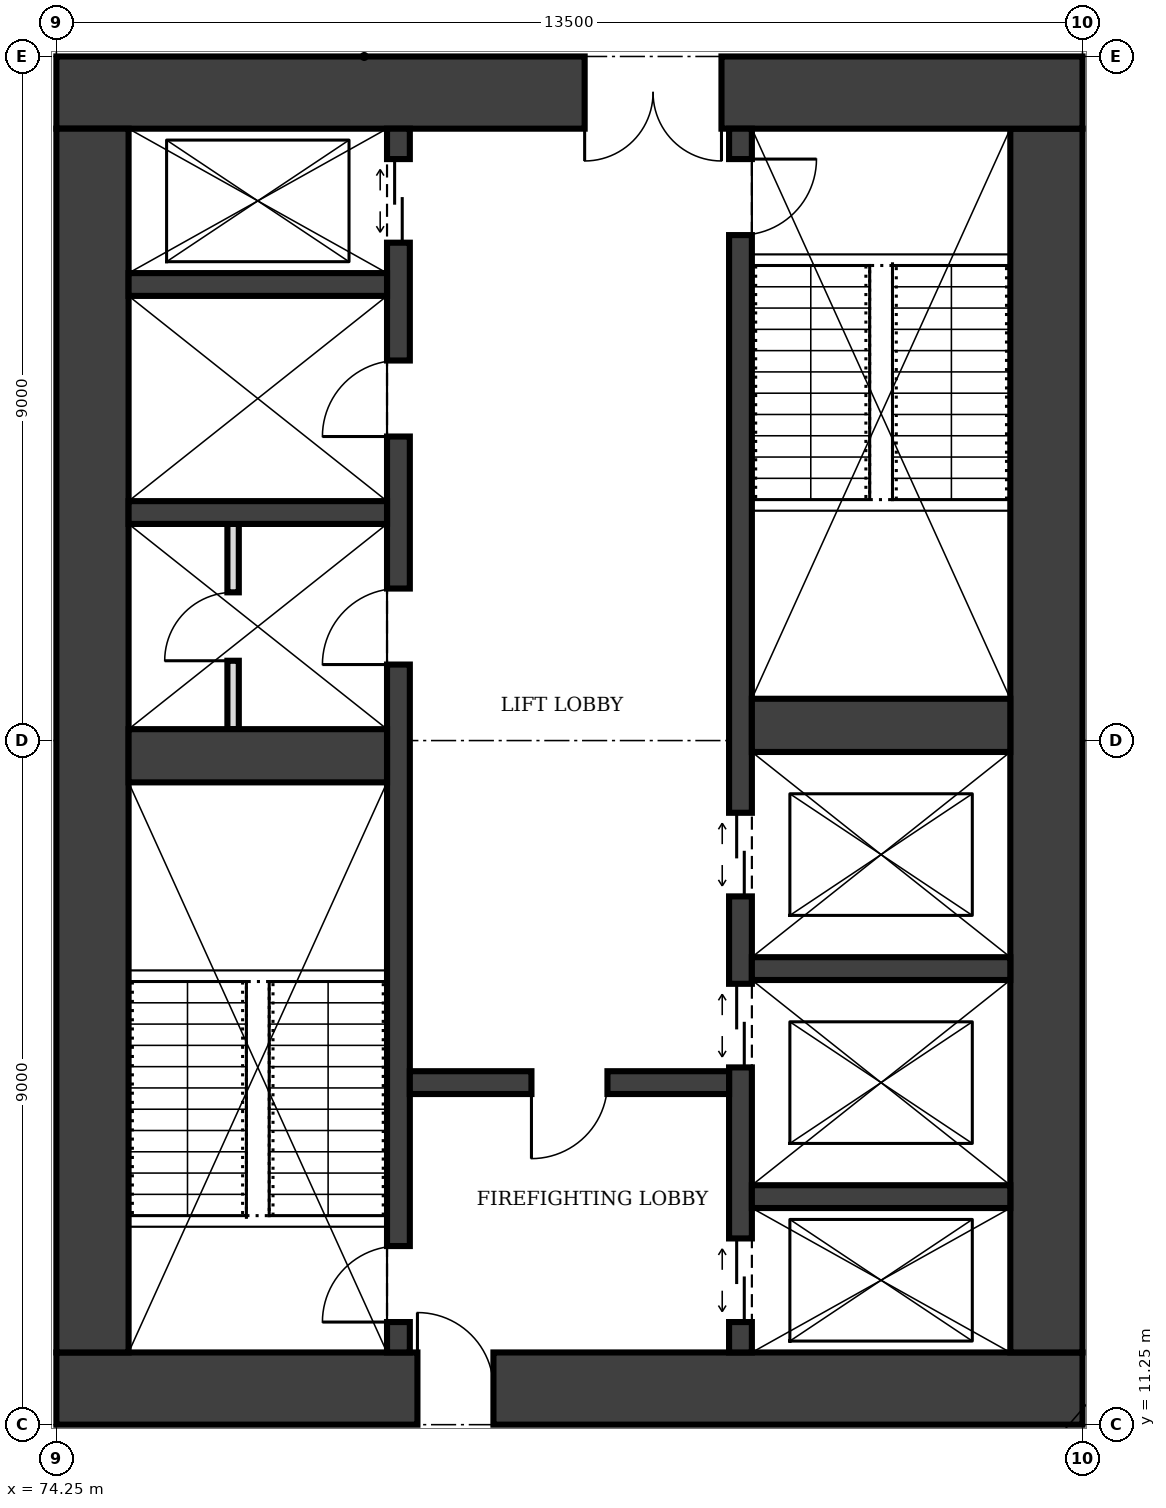
"""IFC4 building model, lengths in metres.
Left out: names, types, materials, properties, quantities, classifications, styles, units other than length and angle.
Written with IfcOpenShell. Run it as: python <this file> out.ifc"""

import sys

from ifc_helpers import new_model, si_unit, direction, frame, frame_2d, origin, place, context, subcontext, project, spatial, rectangle, extrude, element, fill, save


model = new_model("IFC4")
c1 = context("Model", 3, precision=1e-05, world=origin(), true_north=direction((0.0, 1.0)))
c2 = subcontext(c1, "Body", "Model", "MODEL_VIEW")
j1 = project(units=[si_unit("LENGTHUNIT", "METRE"), si_unit("PLANEANGLEUNIT", "RADIAN")], contexts=[c1])
p1 = place(None, origin())
s1 = spatial("IfcSite", under=j1, at=p1, CompositionType="ELEMENT")
p2 = place(p1, origin())
s2 = spatial("IfcBuilding", under=s1, at=p2, CompositionType="ELEMENT")
p3 = place(p2, frame((0.0, 0.0, 137.0)))
s3 = spatial("IfcBuildingStorey", under=s2, at=p3, CompositionType="ELEMENT", Elevation=137.0)
p4 = place(p3, frame((74.25, 11.725, 0.0), z_axis=(0.0, 0.0, 1.0), x_axis=(1.0, 0.0, 0.0)))
e1 = element("IfcWall", 1, at=p4, inside=s3, PredefinedType="SHEAR", context=c2, shape_type="SweptSolid", body=[
    extrude(rectangle(XDim=13.5, YDim=0.95, at=frame_2d((6.75, 0.0))), origin(), (0.0, 0.0, 1.0), 4.0),
])
p5 = place(p4, frame((4.75, 0.0, 0.0)))
e2 = element("IfcOpeningElement", 2, at=p5, cuts=e1, PredefinedType="OPENING", context=c2, shape_type="SweptSolid", body=[
    extrude(rectangle(XDim=1.0, YDim=2.1, at=frame_2d((0.5, 1.05))), frame((0.0, 0.485, 0.0), z_axis=(0.0, -1.0, 0.0), x_axis=(1.0, 0.0, 0.0)), (0.0, 0.0, 1.0), 0.97),
])
p6 = place(p3, frame((87.275, 12.2, 0.0), z_axis=(0.0, 0.0, 1.0), x_axis=(0.0, 1.0, 0.0)))
e3 = element("IfcWall", 3, at=p6, inside=s3, PredefinedType="SHEAR", context=c2, shape_type="SweptSolid", body=[
    extrude(rectangle(XDim=16.1, YDim=0.95, at=frame_2d((8.05, 0.0))), origin(), (0.0, 0.0, 1.0), 4.0),
])
p7 = place(p3, frame((87.75, 28.775, 0.0), z_axis=(0.0, 0.0, 1.0), x_axis=(-1.0, 0.0, 0.0)))
e4 = element("IfcWall", 4, at=p7, inside=s3, PredefinedType="SHEAR", context=c2, shape_type="SweptSolid", body=[
    extrude(rectangle(XDim=13.5, YDim=0.95, at=frame_2d((6.75, 0.0))), origin(), (0.0, 0.0, 1.0), 4.0),
])
p8 = place(p7, frame((4.75, 0.0, 0.0)))
e5 = element("IfcOpeningElement", 5, at=p8, cuts=e4, PredefinedType="OPENING", context=c2, shape_type="SweptSolid", body=[
    extrude(rectangle(XDim=1.8, YDim=2.1, at=frame_2d((0.9, 1.05))), frame((0.0, 0.485, 0.0), z_axis=(0.0, -1.0, 0.0), x_axis=(1.0, 0.0, 0.0)), (0.0, 0.0, 1.0), 0.97),
])
p9 = place(p3, frame((74.725, 28.3, 0.0), z_axis=(0.0, 0.0, 1.0), x_axis=(0.0, -1.0, 0.0)))
e6 = element("IfcWall", 6, at=p9, inside=s3, PredefinedType="SHEAR", context=c2, shape_type="SweptSolid", body=[
    extrude(rectangle(XDim=16.1, YDim=0.95, at=frame_2d((8.05, 0.0))), origin(), (0.0, 0.0, 1.0), 4.0),
])
p10 = place(p3, frame((78.75, 12.2, 0.0), z_axis=(0.0, 0.0, 1.0), x_axis=(0.0, 1.0, 0.0)))
e7 = element("IfcWall", 7, at=p10, inside=s3, PredefinedType="SHEAR", context=c2, shape_type="SweptSolid", body=[
    extrude(rectangle(XDim=16.1, YDim=0.3, at=frame_2d((8.05, 0.0))), origin(), (0.0, 0.0, 1.0), 4.0),
])
p11 = place(p10, frame((0.4, 0.0, 0.0)))
e8 = element("IfcOpeningElement", 8, at=p11, cuts=e7, PredefinedType="OPENING", context=c2, shape_type="SweptSolid", body=[
    extrude(rectangle(XDim=1.0, YDim=2.1, at=frame_2d((0.5, 1.05))), frame((0.0, 0.16, 0.0), z_axis=(0.0, -1.0, 0.0), x_axis=(1.0, 0.0, 0.0)), (0.0, 0.0, 1.0), 0.32),
])
p12 = place(p10, frame((14.6, 0.0, 0.0)))
e9 = element("IfcOpeningElement", 9, at=p12, cuts=e7, PredefinedType="OPENING", context=c2, shape_type="SweptSolid", body=[
    extrude(rectangle(XDim=1.1, YDim=2.1, at=frame_2d((0.55, 1.05))), frame((0.0, 0.16, 0.0), z_axis=(0.0, -1.0, 0.0), x_axis=(1.0, 0.0, 0.0)), (0.0, 0.0, 1.0), 0.32),
])
p13 = place(p10, frame((9.05, 0.0, 0.0)))
e10 = element("IfcOpeningElement", 10, at=p13, cuts=e7, PredefinedType="OPENING", context=c2, shape_type="SweptSolid", body=[
    extrude(rectangle(XDim=1.0, YDim=2.1, at=frame_2d((0.5, 1.05))), frame((0.0, 0.16, 0.0), z_axis=(0.0, -1.0, 0.0), x_axis=(1.0, 0.0, 0.0)), (0.0, 0.0, 1.0), 0.32),
])
p14 = place(p10, frame((12.05, 0.0, 0.0)))
e11 = element("IfcOpeningElement", 11, at=p14, cuts=e7, PredefinedType="OPENING", context=c2, shape_type="SweptSolid", body=[
    extrude(rectangle(XDim=1.0, YDim=2.1, at=frame_2d((0.5, 1.05))), frame((0.0, 0.16, 0.0), z_axis=(0.0, -1.0, 0.0), x_axis=(1.0, 0.0, 0.0)), (0.0, 0.0, 1.0), 0.32),
])
p15 = place(p3, frame((83.25, 12.2, 0.0), z_axis=(0.0, 0.0, 1.0), x_axis=(0.0, 1.0, 0.0)))
e12 = element("IfcWall", 12, at=p15, inside=s3, PredefinedType="SHEAR", context=c2, shape_type="SweptSolid", body=[
    extrude(rectangle(XDim=16.1, YDim=0.3, at=frame_2d((8.05, 0.0))), origin(), (0.0, 0.0, 1.0), 4.0),
])
p16 = place(p15, frame((14.7, 0.0, 0.0)))
e13 = element("IfcOpeningElement", 13, at=p16, cuts=e12, PredefinedType="OPENING", context=c2, shape_type="SweptSolid", body=[
    extrude(rectangle(XDim=1.0, YDim=2.1, at=frame_2d((0.5, 1.05))), frame((0.0, 0.16, 0.0), z_axis=(0.0, -1.0, 0.0), x_axis=(1.0, 0.0, 0.0)), (0.0, 0.0, 1.0), 0.32),
])
p17 = place(p15, frame((0.4, 0.0, 0.0)))
e14 = element("IfcOpeningElement", 14, at=p17, cuts=e12, PredefinedType="OPENING", context=c2, shape_type="SweptSolid", body=[
    extrude(rectangle(XDim=1.1, YDim=2.1, at=frame_2d((0.55, 1.05))), frame((0.0, 0.16, 0.0), z_axis=(0.0, -1.0, 0.0), x_axis=(1.0, 0.0, 0.0)), (0.0, 0.0, 1.0), 0.32),
])
p18 = place(p15, frame((3.75, 0.0, 0.0)))
e15 = element("IfcOpeningElement", 15, at=p18, cuts=e12, PredefinedType="OPENING", context=c2, shape_type="SweptSolid", body=[
    extrude(rectangle(XDim=1.1, YDim=2.1, at=frame_2d((0.55, 1.05))), frame((0.0, 0.16, 0.0), z_axis=(0.0, -1.0, 0.0), x_axis=(1.0, 0.0, 0.0)), (0.0, 0.0, 1.0), 0.32),
])
p19 = place(p15, frame((6.0, 0.0, 0.0)))
e16 = element("IfcOpeningElement", 16, at=p19, cuts=e12, PredefinedType="OPENING", context=c2, shape_type="SweptSolid", body=[
    extrude(rectangle(XDim=1.1, YDim=2.1, at=frame_2d((0.55, 1.05))), frame((0.0, 0.16, 0.0), z_axis=(0.0, -1.0, 0.0), x_axis=(1.0, 0.0, 0.0)), (0.0, 0.0, 1.0), 0.32),
])
p20 = place(p3, frame((75.2, 20.05, 0.0), z_axis=(0.0, 0.0, 1.0), x_axis=(1.0, 0.0, 0.0)))
e17 = element("IfcWall", 17, at=p20, inside=s3, PredefinedType="SHEAR", context=c2, shape_type="SweptSolid", body=[
    extrude(rectangle(XDim=3.4, YDim=0.7, at=frame_2d((1.7, 0.0))), origin(), (0.0, 0.0, 1.0), 4.0),
])
p21 = place(p3, frame((78.9, 15.75, 0.0), z_axis=(0.0, 0.0, 1.0), x_axis=(1.0, 0.0, 0.0)))
e18 = element("IfcWall", 18, at=p21, inside=s3, PredefinedType="SHEAR", context=c2, shape_type="SweptSolid", body=[
    extrude(rectangle(XDim=4.2, YDim=0.3, at=frame_2d((2.1, 0.0))), origin(), (0.0, 0.0, 1.0), 4.0),
])
p22 = place(p21, frame((1.6, 0.0, 0.0)))
e19 = element("IfcOpeningElement", 19, at=p22, cuts=e18, PredefinedType="OPENING", context=c2, shape_type="SweptSolid", body=[
    extrude(rectangle(XDim=1.0, YDim=2.1, at=frame_2d((0.5, 1.05))), frame((0.0, 0.16, 0.0), z_axis=(0.0, -1.0, 0.0), x_axis=(1.0, 0.0, 0.0)), (0.0, 0.0, 1.0), 0.32),
])
for number, where, z_axis, x_axis in (
    (20, (83.4, 14.25, 0.0), (0.0, 0.0, 1.0), (1.0, 0.0, 0.0)),
    (21, (83.4, 17.25, 0.0), (0.0, 0.0, 1.0), (1.0, 0.0, 0.0)),
):
    element("IfcWall", number, at=place(p3, frame(where, z_axis=z_axis, x_axis=x_axis)), inside=s3, PredefinedType="SHEAR", context=c2, shape_type="SweptSolid", body=[
        extrude(rectangle(XDim=3.4, YDim=0.3, at=frame_2d((1.7, 0.0))), origin(), (0.0, 0.0, 1.0), 4.0),
    ])
p23 = place(p3, frame((83.4, 20.45, 0.0), z_axis=(0.0, 0.0, 1.0), x_axis=(1.0, 0.0, 0.0)))
e22 = element("IfcWall", 22, at=p23, inside=s3, PredefinedType="SHEAR", context=c2, shape_type="SweptSolid", body=[
    extrude(rectangle(XDim=3.4, YDim=0.7, at=frame_2d((1.7, 0.0))), origin(), (0.0, 0.0, 1.0), 4.0),
])
for number, where, z_axis, x_axis in (
    (23, (75.2, 23.25, 0.0), (0.0, 0.0, 1.0), (1.0, 0.0, 0.0)),
    (24, (75.2, 26.25, 0.0), (0.0, 0.0, 1.0), (1.0, 0.0, 0.0)),
):
    element("IfcWall", number, at=place(p3, frame(where, z_axis=z_axis, x_axis=x_axis)), inside=s3, PredefinedType="SHEAR", context=c2, shape_type="SweptSolid", body=[
        extrude(rectangle(XDim=3.4, YDim=0.3, at=frame_2d((1.7, 0.0))), origin(), (0.0, 0.0, 1.0), 4.0),
    ])
p24 = place(p3, frame((76.575, 20.4, 0.0), z_axis=(0.0, 0.0, 1.0), x_axis=(0.0, 1.0, 0.0)))
e25 = element("IfcWall", 25, at=p24, inside=s3, PredefinedType="PARTITIONING", context=c2, shape_type="SweptSolid", body=[
    extrude(rectangle(XDim=2.7, YDim=0.15, at=frame_2d((1.35, 0.0))), origin(), (0.0, 0.0, 1.0), 3.75),
])
p25 = place(p24, frame((0.9, 0.0, 0.0)))
e26 = element("IfcOpeningElement", 26, at=p25, cuts=e25, PredefinedType="OPENING", context=c2, shape_type="SweptSolid", body=[
    extrude(rectangle(XDim=0.9, YDim=2.1, at=frame_2d((0.45, 1.05))), frame((0.0, 0.085, 0.0), z_axis=(0.0, -1.0, 0.0), x_axis=(1.0, 0.0, 0.0)), (0.0, 0.0, 1.0), 0.17),
])
p26 = place(p5, origin())
e27 = element("IfcDoor", 27, at=p26, inside=s3, OperationType="SINGLE_SWING_LEFT", PredefinedType="DOOR", context=c2, shape_type="SweptSolid", body=[
    extrude(rectangle(XDim=1.0, YDim=2.1, at=frame_2d((0.5, 1.05))), frame((0.0, 0.025, 0.0), z_axis=(0.0, -1.0, 0.0), x_axis=(1.0, 0.0, 0.0)), (0.0, 0.0, 1.0), 0.05),
])
fill(e2, e27)
p27 = place(p8, origin())
e28 = element("IfcDoor", 28, at=p27, inside=s3, OperationType="DOUBLE_DOOR_SINGLE_SWING", PredefinedType="DOOR", context=c2, shape_type="SweptSolid", body=[
    extrude(rectangle(XDim=1.8, YDim=2.1, at=frame_2d((0.9, 1.05))), frame((0.0, 0.025, 0.0), z_axis=(0.0, -1.0, 0.0), x_axis=(1.0, 0.0, 0.0)), (0.0, 0.0, 1.0), 0.05),
])
fill(e5, e28)
p28 = place(p22, frame((1.0, 0.0, 0.0), z_axis=(0.0, 0.0, 1.0), x_axis=(-1.0, 0.0, 0.0)))
e29 = element("IfcDoor", 29, at=p28, inside=s3, OperationType="SINGLE_SWING_RIGHT", PredefinedType="DOOR", context=c2, shape_type="SweptSolid", body=[
    extrude(rectangle(XDim=1.0, YDim=2.1, at=frame_2d((0.5, 1.05))), frame((0.0, 0.025, 0.0), z_axis=(0.0, -1.0, 0.0), x_axis=(1.0, 0.0, 0.0)), (0.0, 0.0, 1.0), 0.05),
])
fill(e19, e29)
p29 = place(p11, origin())
e30 = element("IfcDoor", 30, at=p29, inside=s3, OperationType="SINGLE_SWING_LEFT", PredefinedType="DOOR", context=c2, shape_type="SweptSolid", body=[
    extrude(rectangle(XDim=1.0, YDim=2.1, at=frame_2d((0.5, 1.05))), frame((0.0, 0.025, 0.0), z_axis=(0.0, -1.0, 0.0), x_axis=(1.0, 0.0, 0.0)), (0.0, 0.0, 1.0), 0.05),
])
fill(e8, e30)
p30 = place(p16, frame((1.0, 0.0, 0.0), z_axis=(0.0, 0.0, 1.0), x_axis=(-1.0, 0.0, 0.0)))
e31 = element("IfcDoor", 31, at=p30, inside=s3, OperationType="SINGLE_SWING_LEFT", PredefinedType="DOOR", context=c2, shape_type="SweptSolid", body=[
    extrude(rectangle(XDim=1.0, YDim=2.1, at=frame_2d((0.5, 1.05))), frame((0.0, 0.025, 0.0), z_axis=(0.0, -1.0, 0.0), x_axis=(1.0, 0.0, 0.0)), (0.0, 0.0, 1.0), 0.05),
])
fill(e13, e31)
p31 = place(p17, origin())
e32 = element("IfcDoor", 32, at=p31, inside=s3, OperationType="DOUBLE_DOOR_SLIDING", PredefinedType="DOOR", context=c2, shape_type="SweptSolid", body=[
    extrude(rectangle(XDim=1.1, YDim=2.1, at=frame_2d((0.55, 1.05))), frame((0.0, 0.025, 0.0), z_axis=(0.0, -1.0, 0.0), x_axis=(1.0, 0.0, 0.0)), (0.0, 0.0, 1.0), 0.05),
])
fill(e14, e32)
p32 = place(p12, origin())
e33 = element("IfcDoor", 33, at=p32, inside=s3, OperationType="DOUBLE_DOOR_SLIDING", PredefinedType="DOOR", context=c2, shape_type="SweptSolid", body=[
    extrude(rectangle(XDim=1.1, YDim=2.1, at=frame_2d((0.55, 1.05))), frame((0.0, 0.025, 0.0), z_axis=(0.0, -1.0, 0.0), x_axis=(1.0, 0.0, 0.0)), (0.0, 0.0, 1.0), 0.05),
])
fill(e9, e33)
p33 = place(p18, origin())
e34 = element("IfcDoor", 34, at=p33, inside=s3, OperationType="DOUBLE_DOOR_SLIDING", PredefinedType="DOOR", context=c2, shape_type="SweptSolid", body=[
    extrude(rectangle(XDim=1.1, YDim=2.1, at=frame_2d((0.55, 1.05))), frame((0.0, 0.025, 0.0), z_axis=(0.0, -1.0, 0.0), x_axis=(1.0, 0.0, 0.0)), (0.0, 0.0, 1.0), 0.05),
])
fill(e15, e34)
p34 = place(p19, origin())
e35 = element("IfcDoor", 35, at=p34, inside=s3, OperationType="DOUBLE_DOOR_SLIDING", PredefinedType="DOOR", context=c2, shape_type="SweptSolid", body=[
    extrude(rectangle(XDim=1.1, YDim=2.1, at=frame_2d((0.55, 1.05))), frame((0.0, 0.025, 0.0), z_axis=(0.0, -1.0, 0.0), x_axis=(1.0, 0.0, 0.0)), (0.0, 0.0, 1.0), 0.05),
])
fill(e16, e35)
p35 = place(p13, origin())
e36 = element("IfcDoor", 36, at=p35, inside=s3, OperationType="SINGLE_SWING_LEFT", PredefinedType="DOOR", context=c2, shape_type="SweptSolid", body=[
    extrude(rectangle(XDim=1.0, YDim=2.1, at=frame_2d((0.5, 1.05))), frame((0.0, 0.025, 0.0), z_axis=(0.0, -1.0, 0.0), x_axis=(1.0, 0.0, 0.0)), (0.0, 0.0, 1.0), 0.05),
])
fill(e10, e36)
p36 = place(p25, origin())
e37 = element("IfcDoor", 37, at=p36, inside=s3, OperationType="SINGLE_SWING_LEFT", PredefinedType="DOOR", context=c2, shape_type="SweptSolid", body=[
    extrude(rectangle(XDim=0.9, YDim=2.1, at=frame_2d((0.45, 1.05))), frame((0.0, 0.025, 0.0), z_axis=(0.0, -1.0, 0.0), x_axis=(1.0, 0.0, 0.0)), (0.0, 0.0, 1.0), 0.05),
])
fill(e26, e37)
p37 = place(p14, origin())
e38 = element("IfcDoor", 38, at=p37, inside=s3, OperationType="SINGLE_SWING_LEFT", PredefinedType="DOOR", context=c2, shape_type="SweptSolid", body=[
    extrude(rectangle(XDim=1.0, YDim=2.1, at=frame_2d((0.5, 1.05))), frame((0.0, 0.025, 0.0), z_axis=(0.0, -1.0, 0.0), x_axis=(1.0, 0.0, 0.0)), (0.0, 0.0, 1.0), 0.05),
])
fill(e11, e38)
save(model, sys.argv[1])
